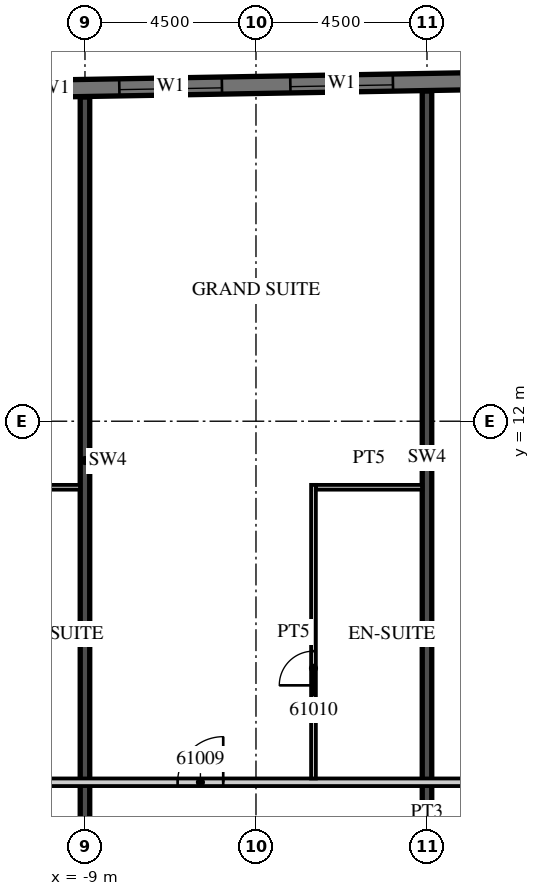
"""IFC4 building model, lengths in metres.
Left out: names, types, materials, properties, quantities, classifications, styles, units other than length and angle.
Written with IfcOpenShell. Run it as: python <this file> out.ifc"""

import sys

from ifc_helpers import new_model, si_unit, direction, frame, frame_2d, origin, place, context, subcontext, project, spatial, rectangle, extrude, element, fill, save


model = new_model("IFC4")
c1 = context("Model", 3, precision=1e-05, world=origin(), true_north=direction((0.0, 1.0)))
c2 = subcontext(c1, "Body", "Model", "MODEL_VIEW")
j1 = project(units=[si_unit("LENGTHUNIT", "METRE"), si_unit("PLANEANGLEUNIT", "RADIAN")], contexts=[c1])
p1 = place(None, origin())
s1 = spatial("IfcSite", under=j1, at=p1, CompositionType="ELEMENT")
p2 = place(p1, origin())
s2 = spatial("IfcBuilding", under=s1, at=p2, CompositionType="ELEMENT")
p3 = place(p2, frame((0.0, 0.0, 247.4)))
s3 = spatial("IfcBuildingStorey", under=s2, at=p3, CompositionType="ELEMENT", Elevation=247.4)
p4 = place(p3, frame((-9.0, 1.4, 0.0), z_axis=(0.0, 0.0, 1.0), x_axis=(0.0, 1.0, 0.0)))
e1 = element("IfcWall", 1, at=p4, inside=s3, PredefinedType="SHEAR", context=c2, shape_type="SweptSolid", body=[
    extrude(rectangle(XDim=19.132, YDim=0.25, at=frame_2d((9.566, 0.0))), origin(), (0.0, 0.0, 1.0), 3.3),
])
p5 = place(p3, frame((0.0, 1.4, 0.0), z_axis=(0.0, 0.0, 1.0), x_axis=(0.0, 1.0, 0.0)))
e2 = element("IfcWall", 2, at=p5, inside=s3, PredefinedType="SHEAR", context=c2, shape_type="SweptSolid", body=[
    extrude(rectangle(XDim=19.289, YDim=0.25, at=frame_2d((9.644, 0.0))), origin(), (0.0, 0.0, 1.0), 3.3),
])
p6 = place(p3, frame((13.504, 21.161, 0.0), z_axis=(0.0, 0.0, 1.0), x_axis=(-0.999847763257, -0.017448504532, 0.0)))
e3 = element("IfcWall", 3, at=p6, inside=s3, PredefinedType="SOLIDWALL", context=c2, shape_type="SweptSolid", body=[
    extrude(rectangle(XDim=46.859, YDim=0.45, at=frame_2d((23.43, 0.0))), origin(), (0.0, 0.0, 1.0), 3.02),
])
p7 = place(p6, frame((0.9, 0.0, 0.45)))
e4 = element("IfcOpeningElement", 4, at=p7, cuts=e3, PredefinedType="OPENING", context=c2, shape_type="SweptSolid", body=[
    extrude(rectangle(XDim=2.7, YDim=2.25, at=frame_2d((1.35, 1.125))), frame((0.0, 0.235, 0.0), z_axis=(0.0, -1.0, 0.0), x_axis=(1.0, 0.0, 0.0)), (0.0, 0.0, 1.0), 0.47),
])
p8 = place(p6, frame((5.401, 0.0, 0.45)))
e5 = element("IfcOpeningElement", 5, at=p8, cuts=e3, PredefinedType="OPENING", context=c2, shape_type="SweptSolid", body=[
    extrude(rectangle(XDim=2.7, YDim=2.25, at=frame_2d((1.35, 1.125))), frame((0.0, 0.235, 0.0), z_axis=(0.0, -1.0, 0.0), x_axis=(1.0, 0.0, 0.0)), (0.0, 0.0, 1.0), 0.47),
])
p9 = place(p6, frame((9.902, 0.0, 0.45)))
e6 = element("IfcOpeningElement", 6, at=p9, cuts=e3, PredefinedType="OPENING", context=c2, shape_type="SweptSolid", body=[
    extrude(rectangle(XDim=2.7, YDim=2.25, at=frame_2d((1.35, 1.125))), frame((0.0, 0.235, 0.0), z_axis=(0.0, -1.0, 0.0), x_axis=(1.0, 0.0, 0.0)), (0.0, 0.0, 1.0), 0.47),
])
p10 = place(p6, frame((14.402, 0.0, 0.45)))
e7 = element("IfcOpeningElement", 7, at=p10, cuts=e3, PredefinedType="OPENING", context=c2, shape_type="SweptSolid", body=[
    extrude(rectangle(XDim=2.7, YDim=2.25, at=frame_2d((1.35, 1.125))), frame((0.0, 0.235, 0.0), z_axis=(0.0, -1.0, 0.0), x_axis=(1.0, 0.0, 0.0)), (0.0, 0.0, 1.0), 0.47),
])
p11 = place(p6, frame((18.903, 0.0, 0.45)))
e8 = element("IfcOpeningElement", 8, at=p11, cuts=e3, PredefinedType="OPENING", context=c2, shape_type="SweptSolid", body=[
    extrude(rectangle(XDim=2.7, YDim=2.25, at=frame_2d((1.35, 1.125))), frame((0.0, 0.235, 0.0), z_axis=(0.0, -1.0, 0.0), x_axis=(1.0, 0.0, 0.0)), (0.0, 0.0, 1.0), 0.47),
])
p12 = place(p6, frame((23.404, 0.0, 0.45)))
e9 = element("IfcOpeningElement", 9, at=p12, cuts=e3, PredefinedType="OPENING", context=c2, shape_type="SweptSolid", body=[
    extrude(rectangle(XDim=2.7, YDim=2.25, at=frame_2d((1.35, 1.125))), frame((0.0, 0.235, 0.0), z_axis=(0.0, -1.0, 0.0), x_axis=(1.0, 0.0, 0.0)), (0.0, 0.0, 1.0), 0.47),
])
p13 = place(p6, frame((27.904, 0.0, 0.45)))
e10 = element("IfcOpeningElement", 10, at=p13, cuts=e3, PredefinedType="OPENING", context=c2, shape_type="SweptSolid", body=[
    extrude(rectangle(XDim=2.7, YDim=2.25, at=frame_2d((1.35, 1.125))), frame((0.0, 0.235, 0.0), z_axis=(0.0, -1.0, 0.0), x_axis=(1.0, 0.0, 0.0)), (0.0, 0.0, 1.0), 0.47),
])
p14 = place(p6, frame((32.405, 0.0, 0.45)))
e11 = element("IfcOpeningElement", 11, at=p14, cuts=e3, PredefinedType="OPENING", context=c2, shape_type="SweptSolid", body=[
    extrude(rectangle(XDim=2.7, YDim=2.25, at=frame_2d((1.35, 1.125))), frame((0.0, 0.235, 0.0), z_axis=(0.0, -1.0, 0.0), x_axis=(1.0, 0.0, 0.0)), (0.0, 0.0, 1.0), 0.47),
])
p15 = place(p6, frame((36.906, 0.0, 0.45)))
e12 = element("IfcOpeningElement", 12, at=p15, cuts=e3, PredefinedType="OPENING", context=c2, shape_type="SweptSolid", body=[
    extrude(rectangle(XDim=2.7, YDim=2.25, at=frame_2d((1.35, 1.125))), frame((0.0, 0.235, 0.0), z_axis=(0.0, -1.0, 0.0), x_axis=(1.0, 0.0, 0.0)), (0.0, 0.0, 1.0), 0.47),
])
p16 = place(p6, frame((41.406, 0.0, 0.45)))
e13 = element("IfcOpeningElement", 13, at=p16, cuts=e3, PredefinedType="OPENING", context=c2, shape_type="SweptSolid", body=[
    extrude(rectangle(XDim=2.7, YDim=2.25, at=frame_2d((1.35, 1.125))), frame((0.0, 0.235, 0.0), z_axis=(0.0, -1.0, 0.0), x_axis=(1.0, 0.0, 0.0)), (0.0, 0.0, 1.0), 0.47),
])
p17 = place(p3, frame((-13.5, 2.5, 0.0), z_axis=(0.0, 0.0, 1.0), x_axis=(1.0, 0.0, 0.0)))
e14 = element("IfcWall", 14, at=p17, inside=s3, PredefinedType="PARTITIONING", context=c2, shape_type="SweptSolid", body=[
    extrude(rectangle(XDim=27.0, YDim=0.2, at=frame_2d((13.5, 0.0))), origin(), (0.0, 0.0, 1.0), 3.02),
])
p18 = place(p17, frame((0.575, 0.0, 0.0)))
e15 = element("IfcOpeningElement", 15, at=p18, cuts=e14, PredefinedType="OPENING", context=c2, shape_type="SweptSolid", body=[
    extrude(rectangle(XDim=1.0, YDim=2.1, at=frame_2d((0.5, 1.05))), frame((0.0, 0.11, 0.0), z_axis=(0.0, -1.0, 0.0), x_axis=(1.0, 0.0, 0.0)), (0.0, 0.0, 1.0), 0.22),
])
p19 = place(p17, frame((6.938, 0.0, 0.0)))
e16 = element("IfcOpeningElement", 16, at=p19, cuts=e14, PredefinedType="OPENING", context=c2, shape_type="SweptSolid", body=[
    extrude(rectangle(XDim=1.2, YDim=2.1, at=frame_2d((0.6, 1.05))), frame((0.0, 0.11, 0.0), z_axis=(0.0, -1.0, 0.0), x_axis=(1.0, 0.0, 0.0)), (0.0, 0.0, 1.0), 0.22),
])
p20 = place(p17, frame((15.938, 0.0, 0.0)))
e17 = element("IfcOpeningElement", 17, at=p20, cuts=e14, PredefinedType="OPENING", context=c2, shape_type="SweptSolid", body=[
    extrude(rectangle(XDim=1.2, YDim=2.1, at=frame_2d((0.6, 1.05))), frame((0.0, 0.11, 0.0), z_axis=(0.0, -1.0, 0.0), x_axis=(1.0, 0.0, 0.0)), (0.0, 0.0, 1.0), 0.22),
])
p21 = place(p17, frame((23.075, 0.0, 0.0)))
e18 = element("IfcOpeningElement", 18, at=p21, cuts=e14, PredefinedType="OPENING", context=c2, shape_type="SweptSolid", body=[
    extrude(rectangle(XDim=1.0, YDim=2.1, at=frame_2d((0.5, 1.05))), frame((0.0, 0.11, 0.0), z_axis=(0.0, -1.0, 0.0), x_axis=(1.0, 0.0, 0.0)), (0.0, 0.0, 1.0), 0.22),
])
p22 = place(p3, frame((-11.375, 10.262, 0.0), z_axis=(0.0, 0.0, 1.0), x_axis=(1.0, 0.0, 0.0)))
e19 = element("IfcWall", 19, at=p22, inside=s3, PredefinedType="PARTITIONING", context=c2, shape_type="SweptSolid", body=[
    extrude(rectangle(XDim=2.25, YDim=0.125, at=frame_2d((1.125, 0.0))), origin(), (0.0, 0.0, 1.0), 3.02),
])
p23 = place(p3, frame((-2.987, 2.6, 0.0), z_axis=(0.0, 0.0, 1.0), x_axis=(0.0, 1.0, 0.0)))
e20 = element("IfcWall", 20, at=p23, inside=s3, PredefinedType="PARTITIONING", context=c2, shape_type="SweptSolid", body=[
    extrude(rectangle(XDim=7.725, YDim=0.125, at=frame_2d((3.862, 0.0))), origin(), (0.0, 0.0, 1.0), 3.02),
])
p24 = place(p23, frame((2.45, 0.0, 0.0)))
e21 = element("IfcOpeningElement", 21, at=p24, cuts=e20, PredefinedType="OPENING", context=c2, shape_type="SweptSolid", body=[
    extrude(rectangle(XDim=0.9, YDim=2.1, at=frame_2d((0.45, 1.05))), frame((0.0, 0.073, 0.0), z_axis=(0.0, -1.0, 0.0), x_axis=(1.0, 0.0, 0.0)), (0.0, 0.0, 1.0), 0.145),
])
p25 = place(p3, frame((-2.925, 10.262, 0.0), z_axis=(0.0, 0.0, 1.0), x_axis=(1.0, 0.0, 0.0)))
e22 = element("IfcWall", 22, at=p25, inside=s3, PredefinedType="PARTITIONING", context=c2, shape_type="SweptSolid", body=[
    extrude(rectangle(XDim=2.8, YDim=0.125, at=frame_2d((1.4, 0.0))), origin(), (0.0, 0.0, 1.0), 3.02),
])
p26 = place(p10, origin())
e23 = element("IfcWindow", 23, at=p26, inside=s3, PartitioningType="SINGLE_PANEL", PredefinedType="WINDOW", context=c2, shape_type="SweptSolid", body=[
    extrude(rectangle(XDim=2.7, YDim=2.25, at=frame_2d((1.35, 1.125))), frame((0.0, 0.09, 0.0), z_axis=(0.0, -1.0, 0.0), x_axis=(1.0, 0.0, 0.0)), (0.0, 0.0, 1.0), 0.06),
])
fill(e7, e23)
p27 = place(p11, origin())
e24 = element("IfcWindow", 24, at=p27, inside=s3, PartitioningType="SINGLE_PANEL", PredefinedType="WINDOW", context=c2, shape_type="SweptSolid", body=[
    extrude(rectangle(XDim=2.7, YDim=2.25, at=frame_2d((1.35, 1.125))), frame((0.0, 0.09, 0.0), z_axis=(0.0, -1.0, 0.0), x_axis=(1.0, 0.0, 0.0)), (0.0, 0.0, 1.0), 0.06),
])
fill(e8, e24)
p28 = place(p19, origin())
e25 = element("IfcDoor", 25, at=p28, inside=s3, OperationType="SINGLE_SWING_RIGHT", PredefinedType="DOOR", context=c2, shape_type="SweptSolid", body=[
    extrude(rectangle(XDim=1.2, YDim=2.1, at=frame_2d((0.6, 1.05))), frame((0.0, 0.025, 0.0), z_axis=(0.0, -1.0, 0.0), x_axis=(1.0, 0.0, 0.0)), (0.0, 0.0, 1.0), 0.05),
])
fill(e16, e25)
p29 = place(p24, origin())
e26 = element("IfcDoor", 26, at=p29, inside=s3, OperationType="SINGLE_SWING_LEFT", PredefinedType="DOOR", context=c2, shape_type="SweptSolid", body=[
    extrude(rectangle(XDim=0.9, YDim=2.1, at=frame_2d((0.45, 1.05))), frame((0.0, 0.025, 0.0), z_axis=(0.0, -1.0, 0.0), x_axis=(1.0, 0.0, 0.0)), (0.0, 0.0, 1.0), 0.05),
])
fill(e21, e26)
save(model, sys.argv[1])
